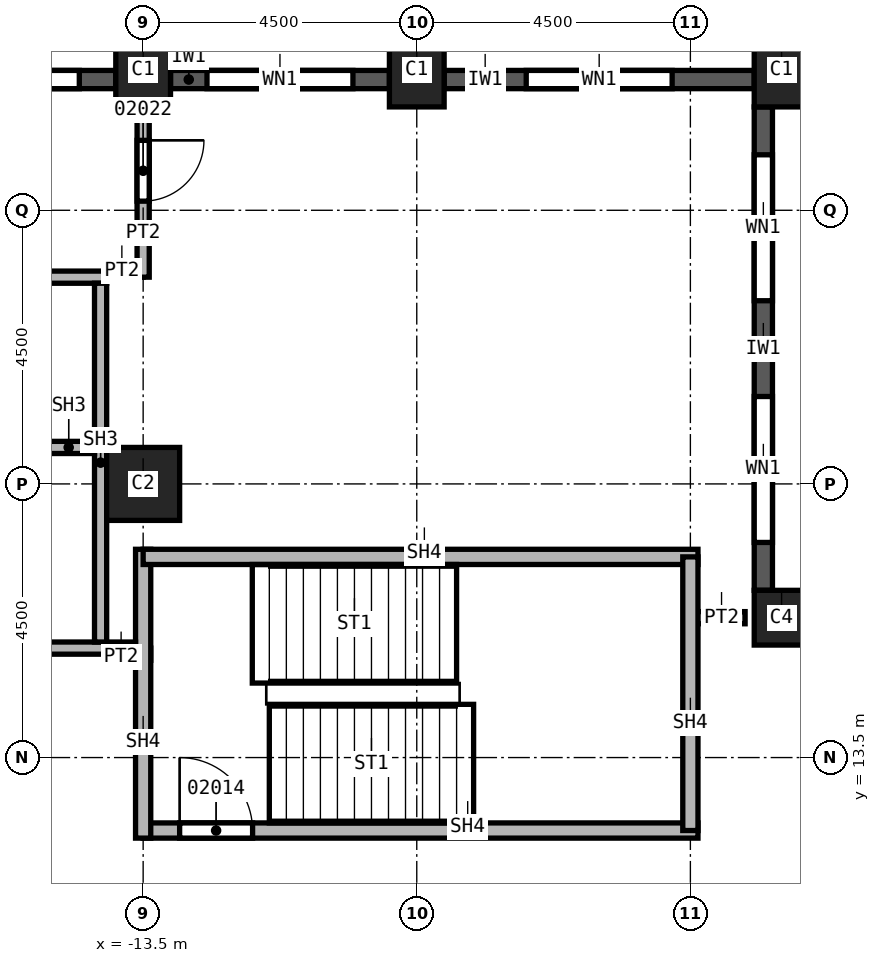
"""IFC4 building model, lengths in metres.
Left out: names, types, materials, properties, quantities, classifications, styles, units other than length and angle.
Written with IfcOpenShell. Run it as: python <this file> out.ifc"""

import sys

from ifc_helpers import new_model, si_unit, direction, frame, frame_2d, origin, origin_2d, place, context, subcontext, project, spatial, rectangle, extrude, element, fill, save


model = new_model("IFC4")
c1 = context("Model", 3, precision=1e-05, world=origin(), true_north=direction((0.0, 1.0)))
c2 = subcontext(c1, "Body", "Model", "MODEL_VIEW")
j1 = project(units=[si_unit("LENGTHUNIT", "METRE"), si_unit("PLANEANGLEUNIT", "RADIAN")], contexts=[c1])
p1 = place(None, origin())
s1 = spatial("IfcSite", under=j1, at=p1, CompositionType="ELEMENT")
p2 = place(p1, origin())
s2 = spatial("IfcBuilding", under=s1, at=p2, CompositionType="ELEMENT")
p3 = place(p2, frame((0.0, 0.0, 80.0)))
s3 = spatial("IfcBuildingStorey", under=s2, at=p3, CompositionType="ELEMENT", Elevation=80.0)
p4 = place(p3, frame((-13.5, 18.0, 0.0), z_axis=(0.0, 0.0, 1.0), x_axis=(1.0, 0.0, 0.0)))
e1 = element("IfcColumn", 1, at=p4, inside=s3, PredefinedType="COLUMN", context=c2, shape_type="SweptSolid", body=[
    extrude(rectangle(XDim=1.2, YDim=1.2, at=origin_2d()), origin(), (0.0, 0.0, 1.0), 3.7),
])
for number, where, z_axis, x_axis in (
    (2, (-3.0, 24.8, 0.0), (0.0, 0.0, 1.0), (1.0, 0.0, 0.0)),
    (3, (-9.0, 24.8, 0.0), (0.0, 0.0, 1.0), (1.0, 0.0, 0.0)),
    (4, (-13.5, 24.8, 0.0), (0.0, 0.0, 1.0), (1.0, 0.0, 0.0)),
):
    element("IfcColumn", number, at=place(p3, frame(where, z_axis=z_axis, x_axis=x_axis)), inside=s3, PredefinedType="COLUMN", context=c2, shape_type="SweptSolid", body=[
        extrude(rectangle(XDim=0.9, YDim=1.2, at=origin_2d()), origin(), (0.0, 0.0, 1.0), 3.7),
    ])
p5 = place(p3, frame((-3.0, 15.8, 0.0), z_axis=(0.0, 0.0, 1.0), x_axis=(1.0, 0.0, 0.0)))
e5 = element("IfcColumn", 5, at=p5, inside=s3, PredefinedType="COLUMN", context=c2, shape_type="SweptSolid", body=[
    extrude(rectangle(XDim=0.9, YDim=0.9, at=origin_2d()), origin(), (0.0, 0.0, 1.0), 3.7),
])
p6 = place(p3, frame((-3.3, 16.25, 0.0), z_axis=(0.0, 0.0, 1.0), x_axis=(0.0, 1.0, 0.0)))
e6 = element("IfcWall", 6, at=p6, inside=s3, PredefinedType="SOLIDWALL", context=c2, shape_type="SweptSolid", body=[
    extrude(rectangle(XDim=7.95, YDim=0.3, at=frame_2d((3.975, 0.0))), origin(), (0.0, 0.0, 1.0), 3.1),
])
p7 = place(p6, frame((0.788, 0.0, 0.8)))
e7 = element("IfcOpeningElement", 7, at=p7, cuts=e6, PredefinedType="OPENING", context=c2, shape_type="SweptSolid", body=[
    extrude(rectangle(XDim=2.4, YDim=1.95, at=frame_2d((1.2, 0.975))), frame((0.0, 0.15, 0.0), z_axis=(0.0, -1.0, 0.0), x_axis=(1.0, 0.0, 0.0)), (0.0, 0.0, 1.0), 0.3),
])
p8 = place(p6, frame((4.762, 0.0, 0.8)))
e8 = element("IfcOpeningElement", 8, at=p8, cuts=e6, PredefinedType="OPENING", context=c2, shape_type="SweptSolid", body=[
    extrude(rectangle(XDim=2.4, YDim=1.95, at=frame_2d((1.2, 0.975))), frame((0.0, 0.15, 0.0), z_axis=(0.0, -1.0, 0.0), x_axis=(1.0, 0.0, 0.0)), (0.0, 0.0, 1.0), 0.3),
])
p9 = place(p3, frame((-3.45, 24.65, 0.0), z_axis=(0.0, 0.0, 1.0), x_axis=(-1.0, 0.0, 0.0)))
e9 = element("IfcWall", 9, at=p9, inside=s3, PredefinedType="SOLIDWALL", context=c2, shape_type="SweptSolid", body=[
    extrude(rectangle(XDim=5.1, YDim=0.3, at=frame_2d((2.55, 0.0))), origin(), (0.0, 0.0, 1.0), 3.1),
])
p10 = place(p9, frame((1.35, 0.0, 0.8)))
e10 = element("IfcOpeningElement", 10, at=p10, cuts=e9, PredefinedType="OPENING", context=c2, shape_type="SweptSolid", body=[
    extrude(rectangle(XDim=2.4, YDim=1.95, at=frame_2d((1.2, 0.975))), frame((0.0, 0.15, 0.0), z_axis=(0.0, -1.0, 0.0), x_axis=(1.0, 0.0, 0.0)), (0.0, 0.0, 1.0), 0.3),
])
p11 = place(p3, frame((-9.45, 24.65, 0.0), z_axis=(0.0, 0.0, 1.0), x_axis=(-1.0, 0.0, 0.0)))
e11 = element("IfcWall", 11, at=p11, inside=s3, PredefinedType="SOLIDWALL", context=c2, shape_type="SweptSolid", body=[
    extrude(rectangle(XDim=3.6, YDim=0.3, at=frame_2d((1.8, 0.0))), origin(), (0.0, 0.0, 1.0), 3.1),
])
p12 = place(p11, frame((0.6, 0.0, 0.8)))
e12 = element("IfcOpeningElement", 12, at=p12, cuts=e11, PredefinedType="OPENING", context=c2, shape_type="SweptSolid", body=[
    extrude(rectangle(XDim=2.4, YDim=1.95, at=frame_2d((1.2, 0.975))), frame((0.0, 0.15, 0.0), z_axis=(0.0, -1.0, 0.0), x_axis=(1.0, 0.0, 0.0)), (0.0, 0.0, 1.0), 0.3),
])
p13 = place(p3, frame((-13.95, 24.65, 0.0), z_axis=(0.0, 0.0, 1.0), x_axis=(-1.0, 0.0, 0.0)))
e13 = element("IfcWall", 13, at=p13, inside=s3, PredefinedType="SOLIDWALL", context=c2, shape_type="SweptSolid", body=[
    extrude(rectangle(XDim=3.6, YDim=0.3, at=frame_2d((1.8, 0.0))), origin(), (0.0, 0.0, 1.0), 3.1),
])
p14 = place(p13, frame((0.6, 0.0, 0.8)))
e14 = element("IfcOpeningElement", 14, at=p14, cuts=e13, PredefinedType="OPENING", context=c2, shape_type="SweptSolid", body=[
    extrude(rectangle(XDim=2.4, YDim=1.95, at=frame_2d((1.2, 0.975))), frame((0.0, 0.15, 0.0), z_axis=(0.0, -1.0, 0.0), x_axis=(1.0, 0.0, 0.0)), (0.0, 0.0, 1.0), 0.3),
])
p15 = place(p3, frame((-14.1, 15.2, 0.0), z_axis=(0.0, 0.0, 1.0), x_axis=(1.0, 0.0, 0.0)))
e15 = element("IfcWall", 15, at=p15, inside=s3, PredefinedType="PARTITIONING", context=c2, shape_type="SweptSolid", body=[
    extrude(rectangle(XDim=0.725, YDim=0.2, at=frame_2d((0.363, 0.0))), origin(), (0.0, 0.0, 1.0), 3.7),
])
p16 = place(p3, frame((-13.5, 21.5, 0.0), z_axis=(0.0, 0.0, 1.0), x_axis=(-1.0, 0.0, 0.0)))
e16 = element("IfcWall", 16, at=p16, inside=s3, PredefinedType="PARTITIONING", context=c2, shape_type="SweptSolid", body=[
    extrude(rectangle(XDim=0.6, YDim=0.2, at=frame_2d((0.3, 0.0))), origin(), (0.0, 0.0, 1.0), 3.7),
])
p17 = place(p3, frame((-13.5, 24.2, 0.0), z_axis=(0.0, 0.0, 1.0), x_axis=(0.0, -1.0, 0.0)))
e17 = element("IfcWall", 17, at=p17, inside=s3, PredefinedType="PARTITIONING", context=c2, shape_type="SweptSolid", body=[
    extrude(rectangle(XDim=2.8, YDim=0.2, at=frame_2d((1.4, 0.0))), origin(), (0.0, 0.0, 1.0), 3.7),
])
p18 = place(p17, frame((0.55, 0.0, 0.0)))
e18 = element("IfcOpeningElement", 18, at=p18, cuts=e17, PredefinedType="OPENING", context=c2, shape_type="SweptSolid", body=[
    extrude(rectangle(XDim=1.0, YDim=2.1, at=frame_2d((0.5, 1.05))), frame((0.0, 0.1, 0.0), z_axis=(0.0, -1.0, 0.0), x_axis=(1.0, 0.0, 0.0)), (0.0, 0.0, 1.0), 0.2),
])
p19 = place(p3, frame((-4.5, 15.8, 0.0), z_axis=(0.0, 0.0, 1.0), x_axis=(1.0, 0.0, 0.0)))
e19 = element("IfcWall", 19, at=p19, inside=s3, PredefinedType="PARTITIONING", context=c2, shape_type="SweptSolid", body=[
    extrude(rectangle(XDim=0.9, YDim=0.2, at=frame_2d((0.45, 0.0))), origin(), (0.0, 0.0, 1.0), 3.7),
])
p20 = place(p3, frame((-13.5, 12.3, 0.0), z_axis=(0.0, 0.0, 1.0), x_axis=(1.0, 0.0, 0.0)))
e20 = element("IfcWall", 20, at=p20, inside=s3, PredefinedType="SOLIDWALL", context=c2, shape_type="SweptSolid", body=[
    extrude(rectangle(XDim=9.125, YDim=0.25, at=frame_2d((4.562, 0.0))), origin(), (0.0, 0.0, 1.0), 3.7),
])
p21 = place(p20, frame((0.6, 0.0, 0.0)))
e21 = element("IfcOpeningElement", 21, at=p21, cuts=e20, PredefinedType="OPENING", context=c2, shape_type="SweptSolid", body=[
    extrude(rectangle(XDim=1.2, YDim=2.1, at=frame_2d((0.6, 1.05))), frame((0.0, 0.125, 0.0), z_axis=(0.0, -1.0, 0.0), x_axis=(1.0, 0.0, 0.0)), (0.0, 0.0, 1.0), 0.25),
])
p22 = place(p3, frame((-13.5, 12.175, 0.0), z_axis=(0.0, 0.0, 1.0), x_axis=(0.0, 1.0, 0.0)))
e22 = element("IfcWall", 22, at=p22, inside=s3, PredefinedType="SOLIDWALL", context=c2, shape_type="SweptSolid", body=[
    extrude(rectangle(XDim=4.75, YDim=0.25, at=frame_2d((2.375, 0.0))), origin(), (0.0, 0.0, 1.0), 3.7),
])
p23 = place(p3, frame((-13.5, 16.8, 0.0), z_axis=(0.0, 0.0, 1.0), x_axis=(1.0, 0.0, 0.0)))
e23 = element("IfcWall", 23, at=p23, inside=s3, PredefinedType="SOLIDWALL", context=c2, shape_type="SweptSolid", body=[
    extrude(rectangle(XDim=9.125, YDim=0.25, at=frame_2d((4.562, 0.0))), origin(), (0.0, 0.0, 1.0), 3.7),
])
p24 = place(p3, frame((-4.5, 16.8, 0.0), z_axis=(0.0, 0.0, 1.0), x_axis=(0.0, -1.0, 0.0)))
e24 = element("IfcWall", 24, at=p24, inside=s3, PredefinedType="SOLIDWALL", context=c2, shape_type="SweptSolid", body=[
    extrude(rectangle(XDim=4.5, YDim=0.25, at=frame_2d((2.25, 0.0))), origin(), (0.0, 0.0, 1.0), 3.7),
])
p25 = place(p3, frame((-21.9, 15.3, 0.0), z_axis=(0.0, 0.0, 1.0), x_axis=(1.0, 0.0, 0.0)))
e25 = element("IfcWall", 25, at=p25, inside=s3, PredefinedType="SOLIDWALL", context=c2, shape_type="SweptSolid", body=[
    extrude(rectangle(XDim=8.275, YDim=0.2, at=frame_2d((4.137, 0.0))), origin(), (0.0, 0.0, 1.0), 3.7),
])
p26 = place(p25, frame((4.8, 0.0, 0.0)))
e26 = element("IfcOpeningElement", 26, at=p26, cuts=e25, PredefinedType="OPENING", context=c2, shape_type="SweptSolid", body=[
    extrude(rectangle(XDim=1.2, YDim=2.1, at=frame_2d((0.6, 1.05))), frame((0.0, 0.1, 0.0), z_axis=(0.0, -1.0, 0.0), x_axis=(1.0, 0.0, 0.0)), (0.0, 0.0, 1.0), 0.2),
])
p27 = place(p3, frame((-21.9, 21.4, 0.0), z_axis=(0.0, 0.0, 1.0), x_axis=(1.0, 0.0, 0.0)))
e27 = element("IfcWall", 27, at=p27, inside=s3, PredefinedType="SOLIDWALL", context=c2, shape_type="SweptSolid", body=[
    extrude(rectangle(XDim=7.8, YDim=0.2, at=frame_2d((3.9, 0.0))), origin(), (0.0, 0.0, 1.0), 3.7),
])
p28 = place(p27, frame((3.2, 0.0, 0.0)))
e28 = element("IfcOpeningElement", 28, at=p28, cuts=e27, PredefinedType="OPENING", context=c2, shape_type="SweptSolid", body=[
    extrude(rectangle(XDim=1.2, YDim=2.1, at=frame_2d((0.6, 1.05))), frame((0.0, 0.1, 0.0), z_axis=(0.0, -1.0, 0.0), x_axis=(1.0, 0.0, 0.0)), (0.0, 0.0, 1.0), 0.2),
])
p29 = place(p3, frame((-14.2, 15.4, 0.0), z_axis=(0.0, 0.0, 1.0), x_axis=(0.0, 1.0, 0.0)))
e29 = element("IfcWall", 29, at=p29, inside=s3, PredefinedType="SOLIDWALL", context=c2, shape_type="SweptSolid", body=[
    extrude(rectangle(XDim=5.9, YDim=0.2, at=frame_2d((2.95, 0.0))), origin(), (0.0, 0.0, 1.0), 3.7),
])
p30 = place(p3, frame((-17.1, 18.6, 0.0), z_axis=(0.0, 0.0, 1.0), x_axis=(1.0, 0.0, 0.0)))
e30 = element("IfcWall", 30, at=p30, inside=s3, PredefinedType="SOLIDWALL", context=c2, shape_type="SweptSolid", body=[
    extrude(rectangle(XDim=2.8, YDim=0.2, at=frame_2d((1.4, 0.0))), origin(), (0.0, 0.0, 1.0), 3.7),
])
p31 = place(p30, frame((0.85, 0.0, 0.0)))
e31 = element("IfcOpeningElement", 31, at=p31, cuts=e30, PredefinedType="OPENING", context=c2, shape_type="SweptSolid", body=[
    extrude(rectangle(XDim=1.1, YDim=2.1, at=frame_2d((0.55, 1.05))), frame((0.0, 0.1, 0.0), z_axis=(0.0, -1.0, 0.0), x_axis=(1.0, 0.0, 0.0)), (0.0, 0.0, 1.0), 0.2),
])
p32 = place(p7, origin())
e32 = element("IfcWindow", 32, at=p32, inside=s3, PartitioningType="SINGLE_PANEL", PredefinedType="WINDOW", context=c2, shape_type="SweptSolid", body=[
    extrude(rectangle(XDim=2.4, YDim=1.95, at=frame_2d((1.2, 0.975))), frame((0.0, 0.03, 0.0), z_axis=(0.0, -1.0, 0.0), x_axis=(1.0, 0.0, 0.0)), (0.0, 0.0, 1.0), 0.06),
])
fill(e7, e32)
p33 = place(p8, origin())
e33 = element("IfcWindow", 33, at=p33, inside=s3, PartitioningType="SINGLE_PANEL", PredefinedType="WINDOW", context=c2, shape_type="SweptSolid", body=[
    extrude(rectangle(XDim=2.4, YDim=1.95, at=frame_2d((1.2, 0.975))), frame((0.0, 0.03, 0.0), z_axis=(0.0, -1.0, 0.0), x_axis=(1.0, 0.0, 0.0)), (0.0, 0.0, 1.0), 0.06),
])
fill(e8, e33)
p34 = place(p10, origin())
e34 = element("IfcWindow", 34, at=p34, inside=s3, PartitioningType="SINGLE_PANEL", PredefinedType="WINDOW", context=c2, shape_type="SweptSolid", body=[
    extrude(rectangle(XDim=2.4, YDim=1.95, at=frame_2d((1.2, 0.975))), frame((0.0, 0.03, 0.0), z_axis=(0.0, -1.0, 0.0), x_axis=(1.0, 0.0, 0.0)), (0.0, 0.0, 1.0), 0.06),
])
fill(e10, e34)
p35 = place(p12, origin())
e35 = element("IfcWindow", 35, at=p35, inside=s3, PartitioningType="SINGLE_PANEL", PredefinedType="WINDOW", context=c2, shape_type="SweptSolid", body=[
    extrude(rectangle(XDim=2.4, YDim=1.95, at=frame_2d((1.2, 0.975))), frame((0.0, 0.03, 0.0), z_axis=(0.0, -1.0, 0.0), x_axis=(1.0, 0.0, 0.0)), (0.0, 0.0, 1.0), 0.06),
])
fill(e12, e35)
p36 = place(p14, origin())
e36 = element("IfcWindow", 36, at=p36, inside=s3, PartitioningType="SINGLE_PANEL", PredefinedType="WINDOW", context=c2, shape_type="SweptSolid", body=[
    extrude(rectangle(XDim=2.4, YDim=1.95, at=frame_2d((1.2, 0.975))), frame((0.0, 0.03, 0.0), z_axis=(0.0, -1.0, 0.0), x_axis=(1.0, 0.0, 0.0)), (0.0, 0.0, 1.0), 0.06),
])
fill(e14, e36)
p37 = place(p21, origin())
e37 = element("IfcDoor", 37, at=p37, inside=s3, OperationType="SINGLE_SWING_LEFT", PredefinedType="DOOR", context=c2, shape_type="SweptSolid", body=[
    extrude(rectangle(XDim=1.2, YDim=2.1, at=frame_2d((0.6, 1.05))), frame((0.0, 0.025, 0.0), z_axis=(0.0, -1.0, 0.0), x_axis=(1.0, 0.0, 0.0)), (0.0, 0.0, 1.0), 0.05),
])
fill(e21, e37)
p38 = place(p18, origin())
e38 = element("IfcDoor", 38, at=p38, inside=s3, OperationType="SINGLE_SWING_LEFT", PredefinedType="DOOR", context=c2, shape_type="SweptSolid", body=[
    extrude(rectangle(XDim=1.0, YDim=2.1, at=frame_2d((0.5, 1.05))), frame((0.0, 0.025, 0.0), z_axis=(0.0, -1.0, 0.0), x_axis=(1.0, 0.0, 0.0)), (0.0, 0.0, 1.0), 0.05),
])
fill(e18, e38)
save(model, sys.argv[1])
